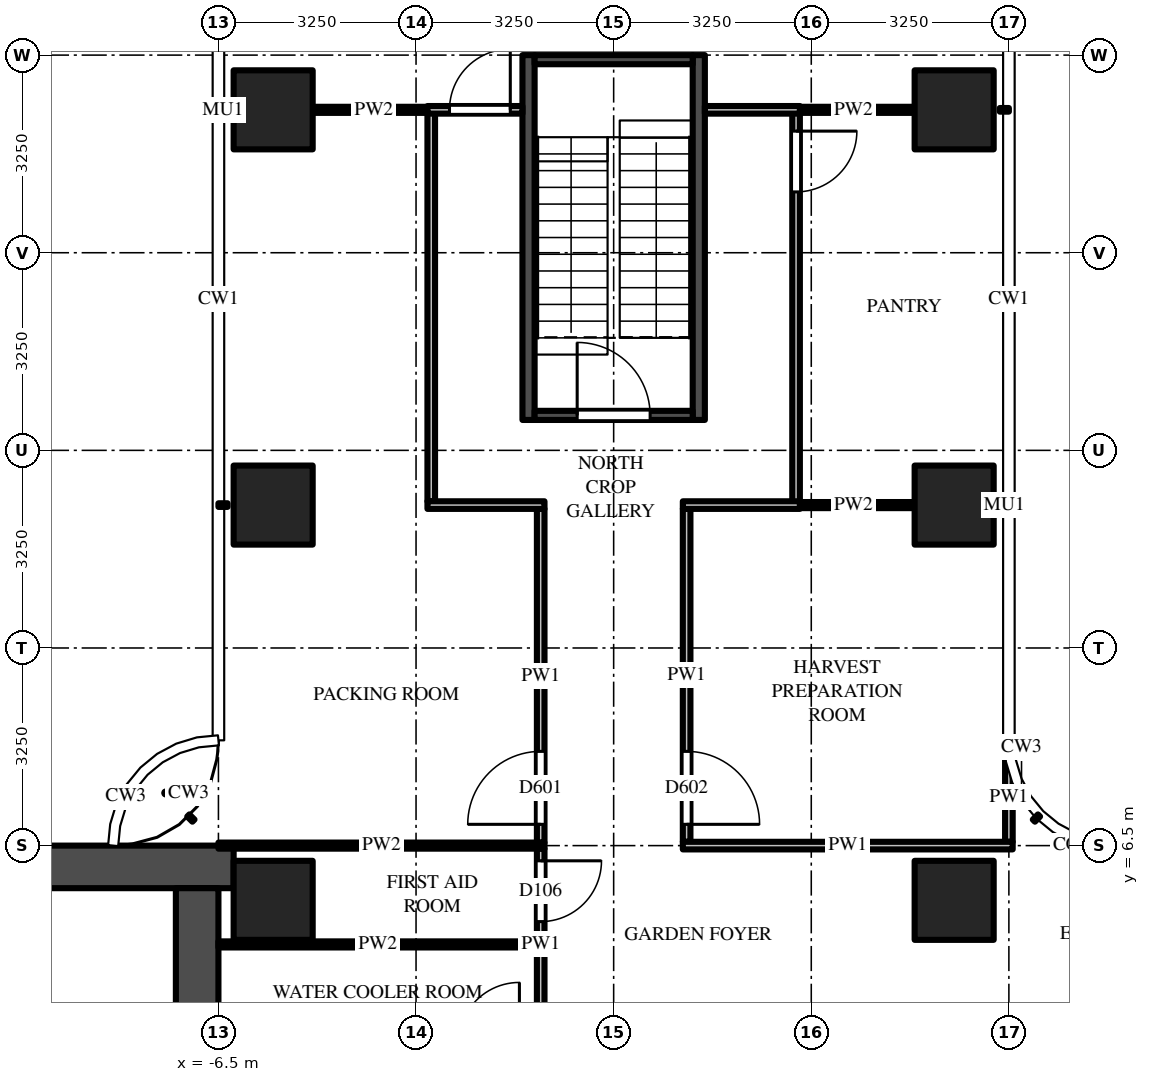
"""IFC4 building model, lengths in metres.
Left out: names, types, materials, properties, quantities, classifications, styles, units other than length and angle.
Written with IfcOpenShell. Run it as: python <this file> out.ifc"""

import sys

from ifc_helpers import new_model, si_unit, direction, frame, frame_2d, origin, origin_2d, place, context, subcontext, project, spatial, rectangle, extrude, source, transform, mapped, element, fill, save


model = new_model("IFC4")
c1 = context("Model", 3, precision=1e-05, world=origin(), true_north=direction((0.0, 1.0)))
c2 = subcontext(c1, "Body", "Model", "MODEL_VIEW")
j1 = project(units=[si_unit("LENGTHUNIT", "METRE"), si_unit("PLANEANGLEUNIT", "RADIAN")], contexts=[c1])
p1 = place(None, origin())
s1 = spatial("IfcSite", under=j1, at=p1, CompositionType="ELEMENT")
p2 = place(p1, origin())
s2 = spatial("IfcBuilding", under=s1, at=p2, CompositionType="ELEMENT")
p3 = place(p2, frame((0.0, 0.0, 115.5)))
s3 = spatial("IfcBuildingStorey", under=s2, at=p3, CompositionType="ELEMENT", Elevation=115.5)
m1 = source(origin(), c2, "Body", "SweptSolid", [
    extrude(rectangle(XDim=1.3, YDim=1.3, at=origin_2d()), origin(), (0.0, 0.0, 1.0), 4.5),
])
for number, where, z_axis, x_axis in (
    (1, (-5.6, 12.1, 0.0), (0.0, 0.0, 1.0), (1.0, 0.0, 0.0)),
    (2, (-5.6, 18.6, 0.0), (0.0, 0.0, 1.0), (1.0, 0.0, 0.0)),
    (3, (5.6, 12.1, 0.0), (0.0, 0.0, 1.0), (1.0, 0.0, 0.0)),
    (4, (5.6, 18.6, 0.0), (0.0, 0.0, 1.0), (1.0, 0.0, 0.0)),
    (5, (5.6, 5.6, 0.0), (0.0, 0.0, 1.0), (1.0, 0.0, 0.0)),
    (6, (-5.6, 5.6, 0.0), (0.0, 0.0, 1.0), (1.0, 0.0, 0.0)),
):
    element("IfcColumn", number, at=place(p3, frame(where, z_axis=z_axis, x_axis=x_axis)), inside=s3, PredefinedType="COLUMN", context=c2, shape_type="MappedRepresentation", body=[
        mapped(m1, transform((0.0, 0.0, 0.0))),
    ])
m2 = source(origin(), c2, "Body", "SweptSolid", [
    extrude(rectangle(XDim=16.5, YDim=0.7, at=frame_2d((8.25, 0.0))), origin(), (0.0, 0.0, 1.0), 4.25),
])
p4 = place(p3, frame((-6.25, 6.15, 0.0), z_axis=(0.0, 0.0, 1.0), x_axis=(-1.0, 0.0, 0.0)))
e7 = element("IfcWall", 7, at=p4, inside=s3, PredefinedType="SHEAR", context=c2, shape_type="MappedRepresentation", body=[
    mapped(m2, transform((0.0, 0.0, 0.0))),
])
m3 = source(origin(), c2, "Body", "SweptSolid", [
    extrude(rectangle(XDim=9.05, YDim=0.7, at=frame_2d((4.525, 0.0))), origin(), (0.0, 0.0, 1.0), 4.25),
])
p5 = place(p3, frame((-6.85, 5.8, 0.0), z_axis=(0.0, 0.0, 1.0), x_axis=(0.0, -1.0, 0.0)))
e8 = element("IfcWall", 8, at=p5, inside=s3, PredefinedType="SHEAR", context=c2, shape_type="MappedRepresentation", body=[
    mapped(m3, transform((0.0, 0.0, 0.0))),
])
m4 = source(origin(), c2, "Body", "SweptSolid", [
    extrude(rectangle(XDim=1.8, YDim=2.1, at=frame_2d((0.9, 1.05))), frame((0.0, 0.36, 0.0), z_axis=(0.0, -1.0, 0.0), x_axis=(1.0, 0.0, 0.0)), (0.0, 0.0, 1.0), 0.72),
])
p6 = place(p5, frame((3.15, 0.0, 0.0)))
e9 = element("IfcOpeningElement", 9, at=p6, cuts=e8, PredefinedType="OPENING", context=c2, shape_type="MappedRepresentation", body=[
    mapped(m4, transform((0.0, 0.0, 0.0))),
])
m5 = source(origin(), c2, "Body", "SweptSolid", [
    extrude(rectangle(XDim=6.0, YDim=0.2, at=frame_2d((3.0, 0.0))), origin(), (0.0, 0.0, 1.0), 4.25),
])
for number, where, z_axis, x_axis in (
    (10, (-1.4, 13.5, 0.0), (0.0, 0.0, 1.0), (0.0, 1.0, 0.0)),
    (11, (1.4, 13.5, 0.0), (0.0, 0.0, 1.0), (0.0, 1.0, 0.0)),
):
    element("IfcWall", number, at=place(p3, frame(where, z_axis=z_axis, x_axis=x_axis)), inside=s3, PredefinedType="SHEAR", context=c2, shape_type="MappedRepresentation", body=[
        mapped(m5, transform((0.0, 0.0, 0.0))),
    ])
m6 = source(origin(), c2, "Body", "SweptSolid", [
    extrude(rectangle(XDim=2.6, YDim=0.15, at=frame_2d((1.3, 0.0))), origin(), (0.0, 0.0, 1.0), 4.25),
])
p7 = place(p3, frame((-1.3, 13.575, 0.0), z_axis=(0.0, 0.0, 1.0), x_axis=(1.0, 0.0, 0.0)))
e12 = element("IfcWall", 12, at=p7, inside=s3, PredefinedType="SHEAR", context=c2, shape_type="MappedRepresentation", body=[
    mapped(m6, transform((0.0, 0.0, 0.0))),
])
m7 = source(origin(), c2, "Body", "SweptSolid", [
    extrude(rectangle(XDim=1.2, YDim=2.1, at=frame_2d((0.6, 1.05))), frame((0.0, 0.085, 0.0), z_axis=(0.0, -1.0, 0.0), x_axis=(1.0, 0.0, 0.0)), (0.0, 0.0, 1.0), 0.17),
])
p8 = place(p7, frame((0.7, 0.0, 0.0)))
e13 = element("IfcOpeningElement", 13, at=p8, cuts=e12, PredefinedType="OPENING", context=c2, shape_type="MappedRepresentation", body=[
    mapped(m7, transform((0.0, 0.0, 0.0))),
])
p9 = place(p3, frame((-1.3, 19.425, 0.0), z_axis=(0.0, 0.0, 1.0), x_axis=(1.0, 0.0, 0.0)))
e14 = element("IfcWall", 14, at=p9, inside=s3, PredefinedType="SHEAR", context=c2, shape_type="MappedRepresentation", body=[
    mapped(m6, transform((0.0, 0.0, 0.0))),
])
m8 = source(origin(), c2, "Body", "SweptSolid", [
    extrude(rectangle(XDim=6.387, YDim=0.125, at=frame_2d((3.194, 0.0))), origin(), (0.0, 0.0, 1.0), 3.468),
])
p10 = place(p3, frame((-3.0, 12.163, 0.0), z_axis=(0.0, 0.0, 1.0), x_axis=(0.0, 1.0, 0.0)))
e15 = element("IfcWall", 15, at=p10, inside=s3, PredefinedType="PARTITIONING", context=c2, shape_type="MappedRepresentation", body=[
    mapped(m8, transform((0.0, 0.0, 0.0))),
])
m9 = source(origin(), c2, "Body", "SweptSolid", [
    extrude(rectangle(XDim=3.137, YDim=0.125, at=frame_2d((1.569, 0.0))), origin(), (0.0, 0.0, 1.0), 3.468),
])
p11 = place(p3, frame((-1.2, 6.45, 0.0), z_axis=(0.0, 0.0, 1.0), x_axis=(0.0, -1.0, 0.0)))
e16 = element("IfcWall", 16, at=p11, inside=s3, PredefinedType="PARTITIONING", context=c2, shape_type="MappedRepresentation", body=[
    mapped(m9, transform((0.0, 0.0, 0.0))),
])
m10 = source(origin(), c2, "Body", "SweptSolid", [
    extrude(rectangle(XDim=1.0, YDim=2.1, at=frame_2d((0.5, 1.05))), frame((0.0, 0.073, 0.0), z_axis=(0.0, -1.0, 0.0), x_axis=(1.0, 0.0, 0.0)), (0.0, 0.0, 1.0), 0.145),
])
p12 = place(p11, frame((0.2, 0.0, 0.0)))
e17 = element("IfcOpeningElement", 17, at=p12, cuts=e16, PredefinedType="OPENING", context=c2, shape_type="MappedRepresentation", body=[
    mapped(m10, transform((0.0, 0.0, 0.0))),
])
m11 = source(origin(), c2, "Body", "SweptSolid", [
    extrude(rectangle(XDim=5.488, YDim=0.125, at=frame_2d((2.744, 0.0))), origin(), (0.0, 0.0, 1.0), 3.468),
])
p13 = place(p3, frame((-1.2, 6.55, 0.0), z_axis=(0.0, 0.0, 1.0), x_axis=(0.0, 1.0, 0.0)))
e18 = element("IfcWall", 18, at=p13, inside=s3, PredefinedType="PARTITIONING", context=c2, shape_type="MappedRepresentation", body=[
    mapped(m11, transform((0.0, 0.0, 0.0))),
])
m12 = source(origin(), c2, "Body", "SweptSolid", [
    extrude(rectangle(XDim=1.2, YDim=2.1, at=frame_2d((0.6, 1.05))), frame((0.0, 0.073, 0.0), z_axis=(0.0, -1.0, 0.0), x_axis=(1.0, 0.0, 0.0)), (0.0, 0.0, 1.0), 0.145),
])
p14 = place(p13, frame((0.3, 0.0, 0.0)))
e19 = element("IfcOpeningElement", 19, at=p14, cuts=e18, PredefinedType="OPENING", context=c2, shape_type="MappedRepresentation", body=[
    mapped(m12, transform((0.0, 0.0, 0.0))),
])
m13 = source(origin(), c2, "Body", "SweptSolid", [
    extrude(rectangle(XDim=5.475, YDim=0.125, at=frame_2d((2.738, 0.0))), origin(), (0.0, 0.0, 1.0), 3.468),
])
p15 = place(p3, frame((1.2, 12.038, 0.0), z_axis=(0.0, 0.0, 1.0), x_axis=(0.0, -1.0, 0.0)))
e20 = element("IfcWall", 20, at=p15, inside=s3, PredefinedType="PARTITIONING", context=c2, shape_type="MappedRepresentation", body=[
    mapped(m13, transform((0.0, 0.0, 0.0))),
])
p16 = place(p15, frame((3.988, 0.0, 0.0)))
e21 = element("IfcOpeningElement", 21, at=p16, cuts=e20, PredefinedType="OPENING", context=c2, shape_type="MappedRepresentation", body=[
    mapped(m12, transform((0.0, 0.0, 0.0))),
])
m14 = source(origin(), c2, "Body", "SweptSolid", [
    extrude(rectangle(XDim=6.4, YDim=0.125, at=frame_2d((3.2, 0.0))), origin(), (0.0, 0.0, 1.0), 3.468),
])
p17 = place(p3, frame((3.0, 18.55, 0.0), z_axis=(0.0, 0.0, 1.0), x_axis=(0.0, -1.0, 0.0)))
e22 = element("IfcWall", 22, at=p17, inside=s3, PredefinedType="PARTITIONING", context=c2, shape_type="MappedRepresentation", body=[
    mapped(m14, transform((0.0, 0.0, 0.0))),
])
p18 = place(p17, frame((0.3, 0.0, 0.0)))
e23 = element("IfcOpeningElement", 23, at=p18, cuts=e22, PredefinedType="OPENING", context=c2, shape_type="MappedRepresentation", body=[
    mapped(m10, transform((0.0, 0.0, 0.0))),
])
m15 = source(origin(), c2, "Body", "SweptSolid", [
    extrude(rectangle(XDim=1.469, YDim=0.125, at=frame_2d((0.734, 0.0))), origin(), (0.0, 0.0, 1.0), 4.25),
])
p19 = place(p3, frame((6.5, 6.562, 0.0), z_axis=(0.0, 0.0, 1.0), x_axis=(0.0, 1.0, 0.0)))
e24 = element("IfcWall", 24, at=p19, inside=s3, PredefinedType="PARTITIONING", context=c2, shape_type="MappedRepresentation", body=[
    mapped(m15, transform((0.0, 0.0, 0.0))),
])
m16 = source(origin(), c2, "Body", "SweptSolid", [
    extrude(rectangle(XDim=5.238, YDim=0.1, at=frame_2d((2.619, 0.0))), origin(), (0.0, 0.0, 1.0), 3.468),
])
p20 = place(p3, frame((-6.5, 4.875, 0.0), z_axis=(0.0, 0.0, 1.0), x_axis=(1.0, 0.0, 0.0)))
e25 = element("IfcWall", 25, at=p20, inside=s3, PredefinedType="PARTITIONING", context=c2, shape_type="MappedRepresentation", body=[
    mapped(m16, transform((0.0, 0.0, 0.0))),
])
m17 = source(origin(), c2, "Body", "SweptSolid", [
    extrude(rectangle(XDim=5.363, YDim=0.1, at=frame_2d((2.681, 0.0))), origin(), (0.0, 0.0, 1.0), 3.33),
])
p21 = place(p3, frame((-6.5, 6.5, 0.0), z_axis=(0.0, 0.0, 1.0), x_axis=(1.0, 0.0, 0.0)))
e26 = element("IfcWall", 26, at=p21, inside=s3, PredefinedType="PARTITIONING", context=c2, shape_type="MappedRepresentation", body=[
    mapped(m17, transform((0.0, 0.0, 0.0))),
])
m18 = source(origin(), c2, "Body", "SweptSolid", [
    extrude(rectangle(XDim=5.425, YDim=0.125, at=frame_2d((2.712, 0.0))), origin(), (0.0, 0.0, 1.0), 3.33),
])
p22 = place(p3, frame((1.137, 6.5, 0.0), z_axis=(0.0, 0.0, 1.0), x_axis=(1.0, 0.0, 0.0)))
e27 = element("IfcWall", 27, at=p22, inside=s3, PredefinedType="PARTITIONING", context=c2, shape_type="MappedRepresentation", body=[
    mapped(m18, transform((0.0, 0.0, 0.0))),
])
m19 = source(origin(), c2, "Body", "SweptSolid", [
    extrude(rectangle(XDim=2.012, YDim=0.1, at=frame_2d((1.006, 0.0))), origin(), (0.0, 0.0, 1.0), 3.468),
])
p23 = place(p3, frame((2.938, 12.1, 0.0), z_axis=(0.0, 0.0, 1.0), x_axis=(1.0, 0.0, 0.0)))
e28 = element("IfcWall", 28, at=p23, inside=s3, PredefinedType="PARTITIONING", context=c2, shape_type="MappedRepresentation", body=[
    mapped(m19, transform((0.0, 0.0, 0.0))),
])
m20 = source(origin(), c2, "Body", "SweptSolid", [
    extrude(rectangle(XDim=1.925, YDim=0.125, at=frame_2d((0.962, 0.0))), origin(), (0.0, 0.0, 1.0), 3.468),
])
for number, where, z_axis, x_axis in (
    (29, (-1.137, 12.1, 0.0), (0.0, 0.0, 1.0), (-1.0, 0.0, 0.0)),
    (30, (3.062, 12.1, 0.0), (0.0, 0.0, 1.0), (-1.0, 0.0, 0.0)),
):
    element("IfcWall", number, at=place(p3, frame(where, z_axis=z_axis, x_axis=x_axis)), inside=s3, PredefinedType="PARTITIONING", context=c2, shape_type="MappedRepresentation", body=[
        mapped(m20, transform((0.0, 0.0, 0.0))),
    ])
m21 = source(origin(), c2, "Body", "SweptSolid", [
    extrude(rectangle(XDim=2.012, YDim=0.1, at=frame_2d((1.006, 0.0))), origin(), (0.0, 0.0, 1.0), 3.697),
])
for number, where, z_axis, x_axis in (
    (31, (-4.95, 18.6, 0.0), (0.0, 0.0, 1.0), (1.0, 0.0, 0.0)),
    (32, (2.938, 18.6, 0.0), (0.0, 0.0, 1.0), (1.0, 0.0, 0.0)),
):
    element("IfcWall", number, at=place(p3, frame(where, z_axis=z_axis, x_axis=x_axis)), inside=s3, PredefinedType="PARTITIONING", context=c2, shape_type="MappedRepresentation", body=[
        mapped(m21, transform((0.0, 0.0, 0.0))),
    ])
m22 = source(origin(), c2, "Body", "SweptSolid", [
    extrude(rectangle(XDim=1.562, YDim=0.125, at=frame_2d((0.781, 0.0))), origin(), (0.0, 0.0, 1.0), 3.697),
])
p24 = place(p3, frame((-3.062, 18.6, 0.0), z_axis=(0.0, 0.0, 1.0), x_axis=(1.0, 0.0, 0.0)))
e33 = element("IfcWall", 33, at=p24, inside=s3, PredefinedType="PARTITIONING", context=c2, shape_type="MappedRepresentation", body=[
    mapped(m22, transform((0.0, 0.0, 0.0))),
])
p25 = place(p24, frame((0.363, 0.0, 0.0)))
e34 = element("IfcOpeningElement", 34, at=p25, cuts=e33, PredefinedType="OPENING", context=c2, shape_type="MappedRepresentation", body=[
    mapped(m10, transform((0.0, 0.0, 0.0))),
])
p26 = place(p3, frame((1.5, 18.6, 0.0), z_axis=(0.0, 0.0, 1.0), x_axis=(1.0, 0.0, 0.0)))
e35 = element("IfcWall", 35, at=p26, inside=s3, PredefinedType="PARTITIONING", context=c2, shape_type="MappedRepresentation", body=[
    mapped(m22, transform((0.0, 0.0, 0.0))),
])
m23 = source(origin(), c2, "Body", "SweptSolid", [
    extrude(rectangle(XDim=1.2, YDim=2.1, at=frame_2d((0.6, 1.05))), frame((0.0, 0.025, 0.0), z_axis=(0.0, -1.0, 0.0), x_axis=(1.0, 0.0, 0.0)), (0.0, 0.0, 1.0), 0.05),
])
p27 = place(p8, origin())
e36 = element("IfcDoor", 36, at=p27, inside=s3, OperationType="SINGLE_SWING_LEFT", PredefinedType="DOOR", context=c2, shape_type="MappedRepresentation", body=[
    mapped(m23, transform((0.0, 0.0, 0.0))),
])
fill(e13, e36)
m24 = source(origin(), c2, "Body", "SweptSolid", [
    extrude(rectangle(XDim=1.0, YDim=2.1, at=frame_2d((0.5, 1.05))), frame((0.0, 0.025, 0.0), z_axis=(0.0, -1.0, 0.0), x_axis=(1.0, 0.0, 0.0)), (0.0, 0.0, 1.0), 0.05),
])
p28 = place(p12, origin())
e37 = element("IfcDoor", 37, at=p28, inside=s3, OperationType="SINGLE_SWING_LEFT", PredefinedType="DOOR", context=c2, shape_type="MappedRepresentation", body=[
    mapped(m24, transform((0.0, 0.0, 0.0))),
])
fill(e17, e37)
p29 = place(p14, origin())
e38 = element("IfcDoor", 38, at=p29, inside=s3, OperationType="SINGLE_SWING_LEFT", PredefinedType="DOOR", context=c2, shape_type="MappedRepresentation", body=[
    mapped(m23, transform((0.0, 0.0, 0.0))),
])
fill(e19, e38)
p30 = place(p16, origin())
e39 = element("IfcDoor", 39, at=p30, inside=s3, OperationType="SINGLE_SWING_RIGHT", PredefinedType="DOOR", context=c2, shape_type="MappedRepresentation", body=[
    mapped(m23, transform((0.0, 0.0, 0.0))),
])
fill(e21, e39)
p31 = place(p18, origin())
e40 = element("IfcDoor", 40, at=p31, inside=s3, OperationType="SINGLE_SWING_LEFT", PredefinedType="DOOR", context=c2, shape_type="MappedRepresentation", body=[
    mapped(m24, transform((0.0, 0.0, 0.0))),
])
fill(e23, e40)
p32 = place(p25, origin())
e41 = element("IfcDoor", 41, at=p32, inside=s3, OperationType="SINGLE_SWING_RIGHT", PredefinedType="DOOR", context=c2, shape_type="MappedRepresentation", body=[
    mapped(m24, transform((0.0, 0.0, 0.0))),
])
fill(e34, e41)
save(model, sys.argv[1])
